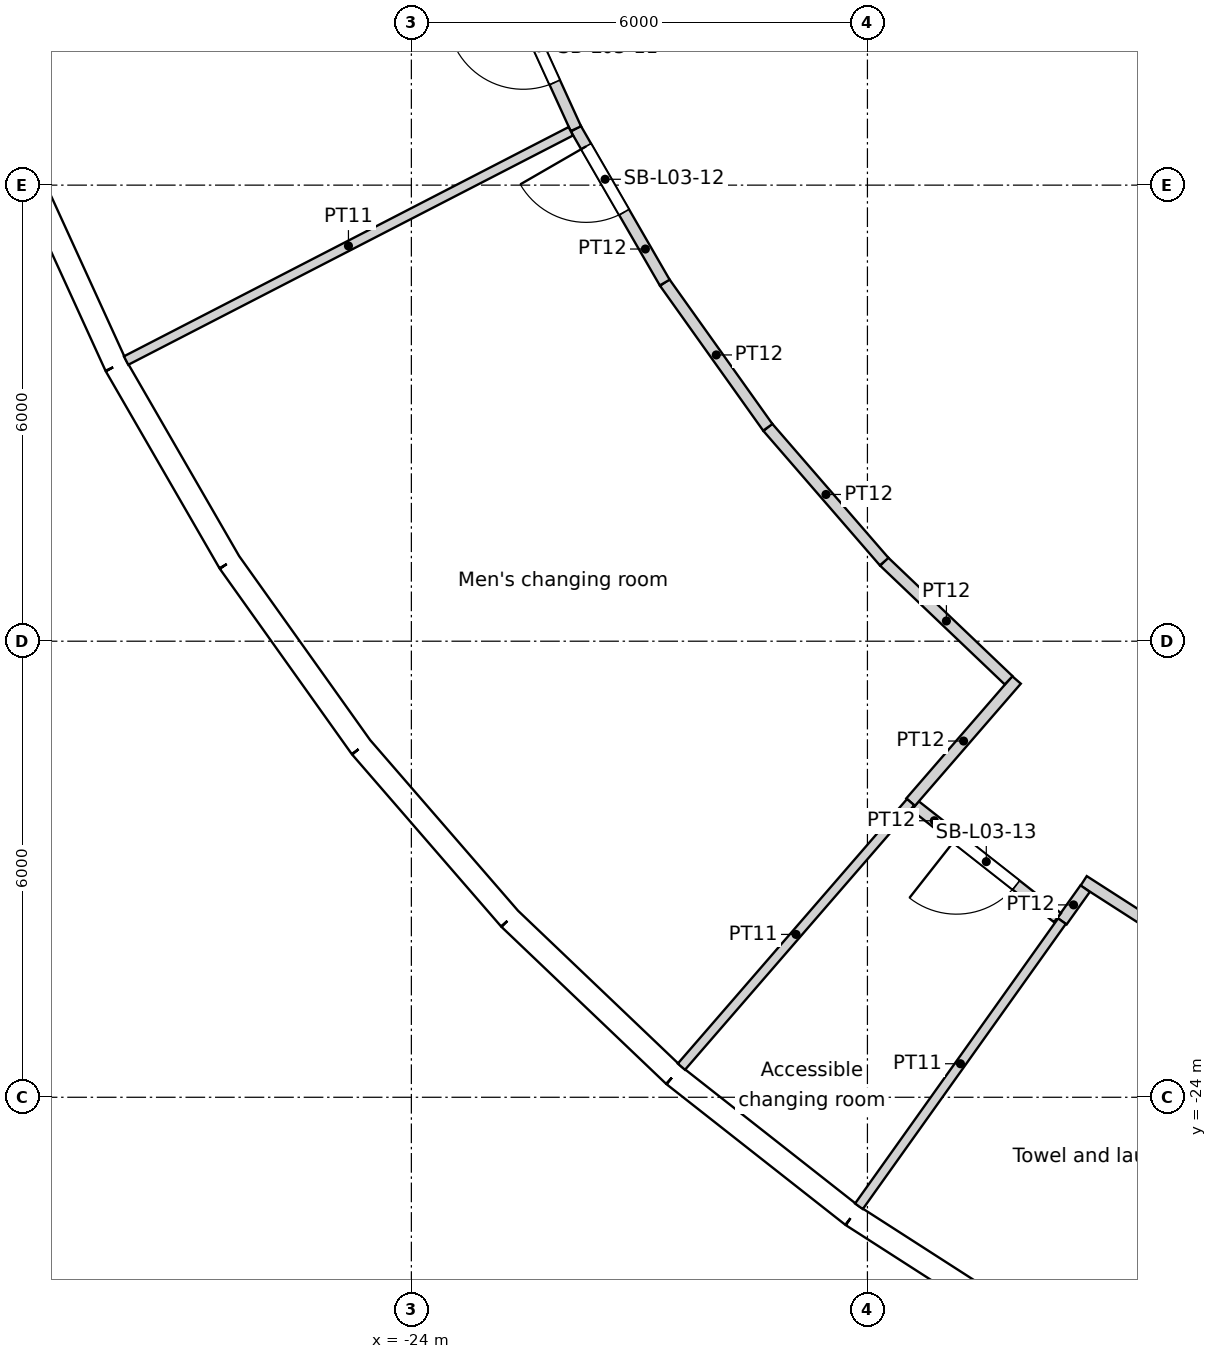
"""IFC4 building model, lengths in metres.
Left out: names, types, materials, properties, quantities, classifications, styles, units other than length and angle.
Written with IfcOpenShell. Run it as: python <this file> out.ifc"""

import sys

from ifc_helpers import new_model, si_unit, direction, frame, frame_2d, origin, origin_2d, place, context, subcontext, project, spatial, rectangle, circle, extrude, element, fill, save


model = new_model("IFC4")
c1 = context("Model", 3, precision=1e-05, world=origin(), true_north=direction((0.0, 1.0)))
c2 = subcontext(c1, "Body", "Model", "MODEL_VIEW")
j1 = project(units=[si_unit("LENGTHUNIT", "METRE"), si_unit("PLANEANGLEUNIT", "RADIAN")], contexts=[c1])
p1 = place(None, origin())
s1 = spatial("IfcSite", under=j1, at=p1, CompositionType="ELEMENT")
p2 = place(p1, origin())
s2 = spatial("IfcBuilding", under=s1, at=p2, CompositionType="ELEMENT")
p3 = place(p2, frame((0.0, 0.0, 18.6)))
s3 = spatial("IfcBuildingStorey", under=s2, at=p3, CompositionType="ELEMENT", Elevation=18.6)
for number, where, z_axis, x_axis in (
    (1, (-26.909, -13.873, 0.0), (0.0, 0.0, 1.0), (1.0, 0.0, 0.0)),
    (2, (-23.797, -18.715, 0.0), (0.0, 0.0, 1.0), (1.0, 0.0, 0.0)),
    (3, (-19.826, -22.88, 0.0), (0.0, 0.0, 1.0), (1.0, 0.0, 0.0)),
    (4, (-15.137, -26.219, 0.0), (0.0, 0.0, 1.0), (1.0, 0.0, 0.0)),
):
    element("IfcColumn", number, at=place(p3, frame(where, z_axis=z_axis, x_axis=x_axis)), inside=s3, PredefinedType="COLUMN", context=c2, shape_type="SweptSolid", body=[
        extrude(circle(Radius=0.7, at=origin_2d()), origin(), (0.0, 0.0, 1.0), 4.8),
    ])
for number, where, z_axis, x_axis in (
    (5, (-20.509, -13.489, 0.0), (0.0, 0.0, 1.0), (1.0, 0.0, 0.0)),
    (6, (-16.846, -17.855, 0.0), (0.0, 0.0, 1.0), (1.0, 0.0, 0.0)),
):
    element("IfcColumn", number, at=place(p3, frame(where, z_axis=z_axis, x_axis=x_axis)), inside=s3, PredefinedType="COLUMN", context=c2, shape_type="SweptSolid", body=[
        extrude(circle(Radius=0.75, at=origin_2d()), origin(), (0.0, 0.0, 1.0), 4.8),
    ])
p4 = place(p3, frame((-13.798, -12.802, 0.0), z_axis=(0.0, 0.0, 1.0), x_axis=(1.0, 0.0, 0.0)))
e7 = element("IfcColumn", 7, at=p4, inside=s3, PredefinedType="COLUMN", context=c2, shape_type="SweptSolid", body=[
    extrude(circle(Radius=0.8, at=origin_2d()), origin(), (0.0, 0.0, 1.0), 4.8),
])
p5 = place(p3, frame((-29.127, -11.661, 0.0), z_axis=(0.0, 0.0, 1.0), x_axis=(0.415373250944, -0.909651066289, 0.0)))
e8 = element("IfcWall", 8, at=p5, inside=s3, PredefinedType="SOLIDWALL", context=c2, shape_type="SweptSolid", body=[
    extrude(rectangle(XDim=2.986, YDim=0.3, at=frame_2d((1.493, 0.0))), origin(), (0.0, 0.0, 1.0), 4.35),
])
p6 = place(p5, frame((1.493, 0.0, 2.0)))
e9 = element("IfcOpeningElement", 9, at=p6, cuts=e8, PredefinedType="OPENING", context=c2, shape_type="SweptSolid", body=[
    extrude(circle(Radius=1.2, at=origin_2d()), frame((0.0, 0.16, 0.0), z_axis=(0.0, -1.0, 0.0), x_axis=(1.0, 0.0, 0.0)), (0.0, 0.0, 1.0), 0.32),
])
p7 = place(p3, frame((-27.887, -14.377, 0.0), z_axis=(0.0, 0.0, 1.0), x_axis=(0.500017373705, -0.866015372839, 0.0)))
e10 = element("IfcWall", 10, at=p7, inside=s3, PredefinedType="SOLIDWALL", context=c2, shape_type="SweptSolid", body=[
    extrude(rectangle(XDim=2.986, YDim=0.3, at=frame_2d((1.493, 0.0))), origin(), (0.0, 0.0, 1.0), 4.35),
])
p8 = place(p7, frame((1.493, 0.0, 2.0)))
e11 = element("IfcOpeningElement", 11, at=p8, cuts=e10, PredefinedType="OPENING", context=c2, shape_type="SweptSolid", body=[
    extrude(circle(Radius=1.2, at=origin_2d()), frame((0.0, 0.16, 0.0), z_axis=(0.0, -1.0, 0.0), x_axis=(1.0, 0.0, 0.0)), (0.0, 0.0, 1.0), 0.32),
])
p9 = place(p3, frame((-26.394, -16.962, 0.0), z_axis=(0.0, 0.0, 1.0), x_axis=(0.580100533892, -0.814544885551, 0.0)))
e12 = element("IfcWall", 12, at=p9, inside=s3, PredefinedType="SOLIDWALL", context=c2, shape_type="SweptSolid", body=[
    extrude(rectangle(XDim=2.986, YDim=0.3, at=frame_2d((1.493, 0.0))), origin(), (0.0, 0.0, 1.0), 4.35),
])
p10 = place(p9, frame((1.493, 0.0, 2.0)))
e13 = element("IfcOpeningElement", 13, at=p10, cuts=e12, PredefinedType="OPENING", context=c2, shape_type="SweptSolid", body=[
    extrude(circle(Radius=1.2, at=origin_2d()), frame((0.0, 0.16, 0.0), z_axis=(0.0, -1.0, 0.0), x_axis=(1.0, 0.0, 0.0)), (0.0, 0.0, 1.0), 0.32),
])
p11 = place(p3, frame((-24.662, -19.394, 0.0), z_axis=(0.0, 0.0, 1.0), x_axis=(0.654809121128, -0.755794294029, 0.0)))
e14 = element("IfcWall", 14, at=p11, inside=s3, PredefinedType="SOLIDWALL", context=c2, shape_type="SweptSolid", body=[
    extrude(rectangle(XDim=2.986, YDim=0.3, at=frame_2d((1.493, 0.0))), origin(), (0.0, 0.0, 1.0), 4.35),
])
p12 = place(p11, frame((1.493, 0.0, 2.0)))
e15 = element("IfcOpeningElement", 15, at=p12, cuts=e14, PredefinedType="OPENING", context=c2, shape_type="SweptSolid", body=[
    extrude(circle(Radius=1.2, at=origin_2d()), frame((0.0, 0.16, 0.0), z_axis=(0.0, -1.0, 0.0), x_axis=(1.0, 0.0, 0.0)), (0.0, 0.0, 1.0), 0.32),
])
p13 = place(p3, frame((-22.707, -21.651, 0.0), z_axis=(0.0, 0.0, 1.0), x_axis=(0.723750841228, -0.690061388444, 0.0)))
e16 = element("IfcWall", 16, at=p13, inside=s3, PredefinedType="SOLIDWALL", context=c2, shape_type="SweptSolid", body=[
    extrude(rectangle(XDim=2.986, YDim=0.3, at=frame_2d((1.493, 0.0))), origin(), (0.0, 0.0, 1.0), 4.35),
])
p14 = place(p13, frame((1.493, 0.0, 2.0)))
e17 = element("IfcOpeningElement", 17, at=p14, cuts=e16, PredefinedType="OPENING", context=c2, shape_type="SweptSolid", body=[
    extrude(circle(Radius=1.2, at=origin_2d()), frame((0.0, 0.16, 0.0), z_axis=(0.0, -1.0, 0.0), x_axis=(1.0, 0.0, 0.0)), (0.0, 0.0, 1.0), 0.32),
])
p15 = place(p3, frame((-20.546, -23.711, 0.0), z_axis=(0.0, 0.0, 1.0), x_axis=(0.786043032847, -0.618171780747, 0.0)))
e18 = element("IfcWall", 18, at=p15, inside=s3, PredefinedType="SOLIDWALL", context=c2, shape_type="SweptSolid", body=[
    extrude(rectangle(XDim=2.986, YDim=0.3, at=frame_2d((1.493, 0.0))), origin(), (0.0, 0.0, 1.0), 4.35),
])
p16 = place(p15, frame((1.493, 0.0, 2.0)))
e19 = element("IfcOpeningElement", 19, at=p16, cuts=e18, PredefinedType="OPENING", context=c2, shape_type="SweptSolid", body=[
    extrude(circle(Radius=1.2, at=origin_2d()), frame((0.0, 0.16, 0.0), z_axis=(0.0, -1.0, 0.0), x_axis=(1.0, 0.0, 0.0)), (0.0, 0.0, 1.0), 0.32),
])
p17 = place(p3, frame((-18.199, -25.557, 0.0), z_axis=(0.0, 0.0, 1.0), x_axis=(0.841242231846, -0.540658401727, 0.0)))
e20 = element("IfcWall", 20, at=p17, inside=s3, PredefinedType="SOLIDWALL", context=c2, shape_type="SweptSolid", body=[
    extrude(rectangle(XDim=2.986, YDim=0.3, at=frame_2d((1.493, 0.0))), origin(), (0.0, 0.0, 1.0), 4.35),
])
p18 = place(p17, frame((1.493, 0.0, 2.0)))
e21 = element("IfcOpeningElement", 21, at=p18, cuts=e20, PredefinedType="OPENING", context=c2, shape_type="SweptSolid", body=[
    extrude(circle(Radius=1.2, at=origin_2d()), frame((0.0, 0.16, 0.0), z_axis=(0.0, -1.0, 0.0), x_axis=(1.0, 0.0, 0.0)), (0.0, 0.0, 1.0), 0.32),
])
p19 = place(p3, frame((-27.753, -14.308, 0.0), z_axis=(0.0, 0.0, 1.0), x_axis=(0.888824883914, 0.458247013886, 0.0)))
e22 = element("IfcWall", 22, at=p19, inside=s3, PredefinedType="PARTITIONING", context=c2, shape_type="SweptSolid", body=[
    extrude(rectangle(XDim=6.582, YDim=0.125, at=frame_2d((3.291, 0.0))), origin(), (0.0, 0.0, 1.0), 3.75),
])
p20 = place(p3, frame((-21.836, -11.257, 0.0), z_axis=(0.0, 0.0, 1.0), x_axis=(-0.415438886862, 0.909621092149, 0.0)))
e23 = element("IfcWall", 23, at=p20, inside=s3, PredefinedType="PARTITIONING", context=c2, shape_type="SweptSolid", body=[
    extrude(rectangle(XDim=2.338, YDim=0.15, at=frame_2d((1.169, 0.0))), origin(), (0.0, 0.0, 1.0), 3.75),
])
p21 = place(p20, frame((0.669, 0.0, 0.0)))
e24 = element("IfcOpeningElement", 24, at=p21, cuts=e23, PredefinedType="OPENING", context=c2, shape_type="SweptSolid", body=[
    extrude(rectangle(XDim=1.0, YDim=2.1, at=frame_2d((0.5, 1.05))), frame((0.0, 0.075, 0.0), z_axis=(0.0, -1.0, 0.0), x_axis=(1.0, 0.0, 0.0)), (0.0, 0.0, 1.0), 0.15),
])
p22 = place(p3, frame((-20.667, -13.282, 0.0), z_axis=(0.0, 0.0, 1.0), x_axis=(-0.500002679963, 0.866023856502, 0.0)))
e25 = element("IfcWall", 25, at=p22, inside=s3, PredefinedType="PARTITIONING", context=c2, shape_type="SweptSolid", body=[
    extrude(rectangle(XDim=2.338, YDim=0.15, at=frame_2d((1.169, 0.0))), origin(), (0.0, 0.0, 1.0), 3.75),
])
p23 = place(p22, frame((1.069, 0.0, 0.0)))
e26 = element("IfcOpeningElement", 26, at=p23, cuts=e25, PredefinedType="OPENING", context=c2, shape_type="SweptSolid", body=[
    extrude(rectangle(XDim=1.0, YDim=2.1, at=frame_2d((0.5, 1.05))), frame((0.0, 0.075, 0.0), z_axis=(0.0, -1.0, 0.0), x_axis=(1.0, 0.0, 0.0)), (0.0, 0.0, 1.0), 0.15),
])
p24 = place(p3, frame((-20.667, -13.282, 0.0), z_axis=(0.0, 0.0, 1.0), x_axis=(0.580032319147, -0.814593462252, 0.0)))
e27 = element("IfcWall", 27, at=p24, inside=s3, PredefinedType="PARTITIONING", context=c2, shape_type="SweptSolid", body=[
    extrude(rectangle(XDim=2.338, YDim=0.15, at=frame_2d((1.169, 0.0))), origin(), (0.0, 0.0, 1.0), 3.75),
])
p25 = place(p3, frame((-20.448, -23.598, 0.0), z_axis=(0.0, 0.0, 1.0), x_axis=(0.654833653961, 0.755773038445, 0.0)))
e28 = element("IfcWall", 28, at=p25, inside=s3, PredefinedType="PARTITIONING", context=c2, shape_type="SweptSolid", body=[
    extrude(rectangle(XDim=4.605, YDim=0.125, at=frame_2d((2.303, 0.0))), origin(), (0.0, 0.0, 1.0), 3.75),
])
p26 = place(p3, frame((-19.311, -15.186, 0.0), z_axis=(0.0, 0.0, 1.0), x_axis=(0.654866925236, -0.755744209526, 0.0)))
e29 = element("IfcWall", 29, at=p26, inside=s3, PredefinedType="PARTITIONING", context=c2, shape_type="SweptSolid", body=[
    extrude(rectangle(XDim=2.338, YDim=0.15, at=frame_2d((1.169, 0.0))), origin(), (0.0, 0.0, 1.0), 3.75),
])
p27 = place(p3, frame((-18.112, -25.435, 0.0), z_axis=(0.0, 0.0, 1.0), x_axis=(0.580018951557, 0.814602980497, 0.0)))
e30 = element("IfcWall", 30, at=p27, inside=s3, PredefinedType="PARTITIONING", context=c2, shape_type="SweptSolid", body=[
    extrude(rectangle(XDim=4.605, YDim=0.125, at=frame_2d((2.303, 0.0))), origin(), (0.0, 0.0, 1.0), 3.75),
])
p28 = place(p3, frame((-17.78, -16.953, 0.0), z_axis=(0.0, 0.0, 1.0), x_axis=(0.723737544967, -0.690075333573, 0.0)))
e31 = element("IfcWall", 31, at=p28, inside=s3, PredefinedType="PARTITIONING", context=c2, shape_type="SweptSolid", body=[
    extrude(rectangle(XDim=2.263, YDim=0.15, at=frame_2d((1.131, 0.0))), origin(), (0.0, 0.0, 1.0), 3.75),
])
p29 = place(p3, frame((-17.432, -20.117, 0.0), z_axis=(0.0, 0.0, 1.0), x_axis=(0.654864995974, 0.755745881264, 0.0)))
e32 = element("IfcWall", 32, at=p29, inside=s3, PredefinedType="PARTITIONING", context=c2, shape_type="SweptSolid", body=[
    extrude(rectangle(XDim=2.127, YDim=0.15, at=frame_2d((1.063, 0.0))), origin(), (0.0, 0.0, 1.0), 3.75),
])
p30 = place(p3, frame((-15.5, -21.637, 0.0), z_axis=(0.0, 0.0, 1.0), x_axis=(-0.786108543129, 0.618088471353, 0.0)))
e33 = element("IfcWall", 33, at=p30, inside=s3, PredefinedType="PARTITIONING", context=c2, shape_type="SweptSolid", body=[
    extrude(rectangle(XDim=2.383, YDim=0.15, at=frame_2d((1.191, 0.0))), origin(), (0.0, 0.0, 1.0), 3.75),
])
p31 = place(p30, frame((0.691, 0.0, 0.0)))
e34 = element("IfcOpeningElement", 34, at=p31, cuts=e33, PredefinedType="OPENING", context=c2, shape_type="SweptSolid", body=[
    extrude(rectangle(XDim=1.0, YDim=2.1, at=frame_2d((0.5, 1.05))), frame((0.0, 0.075, 0.0), z_axis=(0.0, -1.0, 0.0), x_axis=(1.0, 0.0, 0.0)), (0.0, 0.0, 1.0), 0.15),
])
p32 = place(p3, frame((-15.441, -21.683, 0.0), z_axis=(0.0, 0.0, 1.0), x_axis=(0.580359473183, 0.81436041277, 0.0)))
e35 = element("IfcWall", 35, at=p32, inside=s3, PredefinedType="PARTITIONING", context=c2, shape_type="SweptSolid", body=[
    extrude(rectangle(XDim=0.526, YDim=0.15, at=frame_2d((0.263, 0.0))), origin(), (0.0, 0.0, 1.0), 3.75),
])
p33 = place(p3, frame((-15.155, -21.153, 0.0), z_axis=(0.0, 0.0, 1.0), x_axis=(0.841209568092, -0.540709221811, 0.0)))
e36 = element("IfcWall", 36, at=p33, inside=s3, PredefinedType="PARTITIONING", context=c2, shape_type="SweptSolid", body=[
    extrude(rectangle(XDim=2.551, YDim=0.15, at=frame_2d((1.275, 0.0))), origin(), (0.0, 0.0, 1.0), 3.75),
])
p34 = place(p6, origin())
e37 = element("IfcWindow", 37, at=p34, inside=s3, PartitioningType="SINGLE_PANEL", PredefinedType="WINDOW", context=c2, shape_type="SweptSolid", body=[
    extrude(circle(Radius=1.2, at=origin_2d()), frame((0.0, 0.12, 0.0), z_axis=(0.0, -1.0, 0.0), x_axis=(1.0, 0.0, 0.0)), (0.0, 0.0, 1.0), 0.1),
])
fill(e9, e37)
p35 = place(p8, origin())
e38 = element("IfcWindow", 38, at=p35, inside=s3, PartitioningType="SINGLE_PANEL", PredefinedType="WINDOW", context=c2, shape_type="SweptSolid", body=[
    extrude(circle(Radius=1.2, at=origin_2d()), frame((0.0, 0.12, 0.0), z_axis=(0.0, -1.0, 0.0), x_axis=(1.0, 0.0, 0.0)), (0.0, 0.0, 1.0), 0.1),
])
fill(e11, e38)
p36 = place(p10, origin())
e39 = element("IfcWindow", 39, at=p36, inside=s3, PartitioningType="SINGLE_PANEL", PredefinedType="WINDOW", context=c2, shape_type="SweptSolid", body=[
    extrude(circle(Radius=1.2, at=origin_2d()), frame((0.0, 0.12, 0.0), z_axis=(0.0, -1.0, 0.0), x_axis=(1.0, 0.0, 0.0)), (0.0, 0.0, 1.0), 0.1),
])
fill(e13, e39)
p37 = place(p12, origin())
e40 = element("IfcWindow", 40, at=p37, inside=s3, PartitioningType="SINGLE_PANEL", PredefinedType="WINDOW", context=c2, shape_type="SweptSolid", body=[
    extrude(circle(Radius=1.2, at=origin_2d()), frame((0.0, 0.12, 0.0), z_axis=(0.0, -1.0, 0.0), x_axis=(1.0, 0.0, 0.0)), (0.0, 0.0, 1.0), 0.1),
])
fill(e15, e40)
p38 = place(p14, origin())
e41 = element("IfcWindow", 41, at=p38, inside=s3, PartitioningType="SINGLE_PANEL", PredefinedType="WINDOW", context=c2, shape_type="SweptSolid", body=[
    extrude(circle(Radius=1.2, at=origin_2d()), frame((0.0, 0.12, 0.0), z_axis=(0.0, -1.0, 0.0), x_axis=(1.0, 0.0, 0.0)), (0.0, 0.0, 1.0), 0.1),
])
fill(e17, e41)
p39 = place(p16, origin())
e42 = element("IfcWindow", 42, at=p39, inside=s3, PartitioningType="SINGLE_PANEL", PredefinedType="WINDOW", context=c2, shape_type="SweptSolid", body=[
    extrude(circle(Radius=1.2, at=origin_2d()), frame((0.0, 0.12, 0.0), z_axis=(0.0, -1.0, 0.0), x_axis=(1.0, 0.0, 0.0)), (0.0, 0.0, 1.0), 0.1),
])
fill(e19, e42)
p40 = place(p18, origin())
e43 = element("IfcWindow", 43, at=p40, inside=s3, PartitioningType="SINGLE_PANEL", PredefinedType="WINDOW", context=c2, shape_type="SweptSolid", body=[
    extrude(circle(Radius=1.2, at=origin_2d()), frame((0.0, 0.12, 0.0), z_axis=(0.0, -1.0, 0.0), x_axis=(1.0, 0.0, 0.0)), (0.0, 0.0, 1.0), 0.1),
])
fill(e21, e43)
p41 = place(p21, origin())
e44 = element("IfcDoor", 44, at=p41, inside=s3, OperationType="SINGLE_SWING_RIGHT", PredefinedType="DOOR", context=c2, shape_type="SweptSolid", body=[
    extrude(rectangle(XDim=1.0, YDim=2.1, at=frame_2d((0.5, 1.05))), frame((0.0, 0.025, 0.0), z_axis=(0.0, -1.0, 0.0), x_axis=(1.0, 0.0, 0.0)), (0.0, 0.0, 1.0), 0.05),
])
fill(e24, e44)
p42 = place(p23, origin())
e45 = element("IfcDoor", 45, at=p42, inside=s3, OperationType="SINGLE_SWING_RIGHT", PredefinedType="DOOR", context=c2, shape_type="SweptSolid", body=[
    extrude(rectangle(XDim=1.0, YDim=2.1, at=frame_2d((0.5, 1.05))), frame((0.0, 0.025, 0.0), z_axis=(0.0, -1.0, 0.0), x_axis=(1.0, 0.0, 0.0)), (0.0, 0.0, 1.0), 0.05),
])
fill(e26, e45)
p43 = place(p31, origin())
e46 = element("IfcDoor", 46, at=p43, inside=s3, OperationType="SINGLE_SWING_RIGHT", PredefinedType="DOOR", context=c2, shape_type="SweptSolid", body=[
    extrude(rectangle(XDim=1.0, YDim=2.1, at=frame_2d((0.5, 1.05))), frame((0.0, 0.025, 0.0), z_axis=(0.0, -1.0, 0.0), x_axis=(1.0, 0.0, 0.0)), (0.0, 0.0, 1.0), 0.05),
])
fill(e34, e46)
save(model, sys.argv[1])
